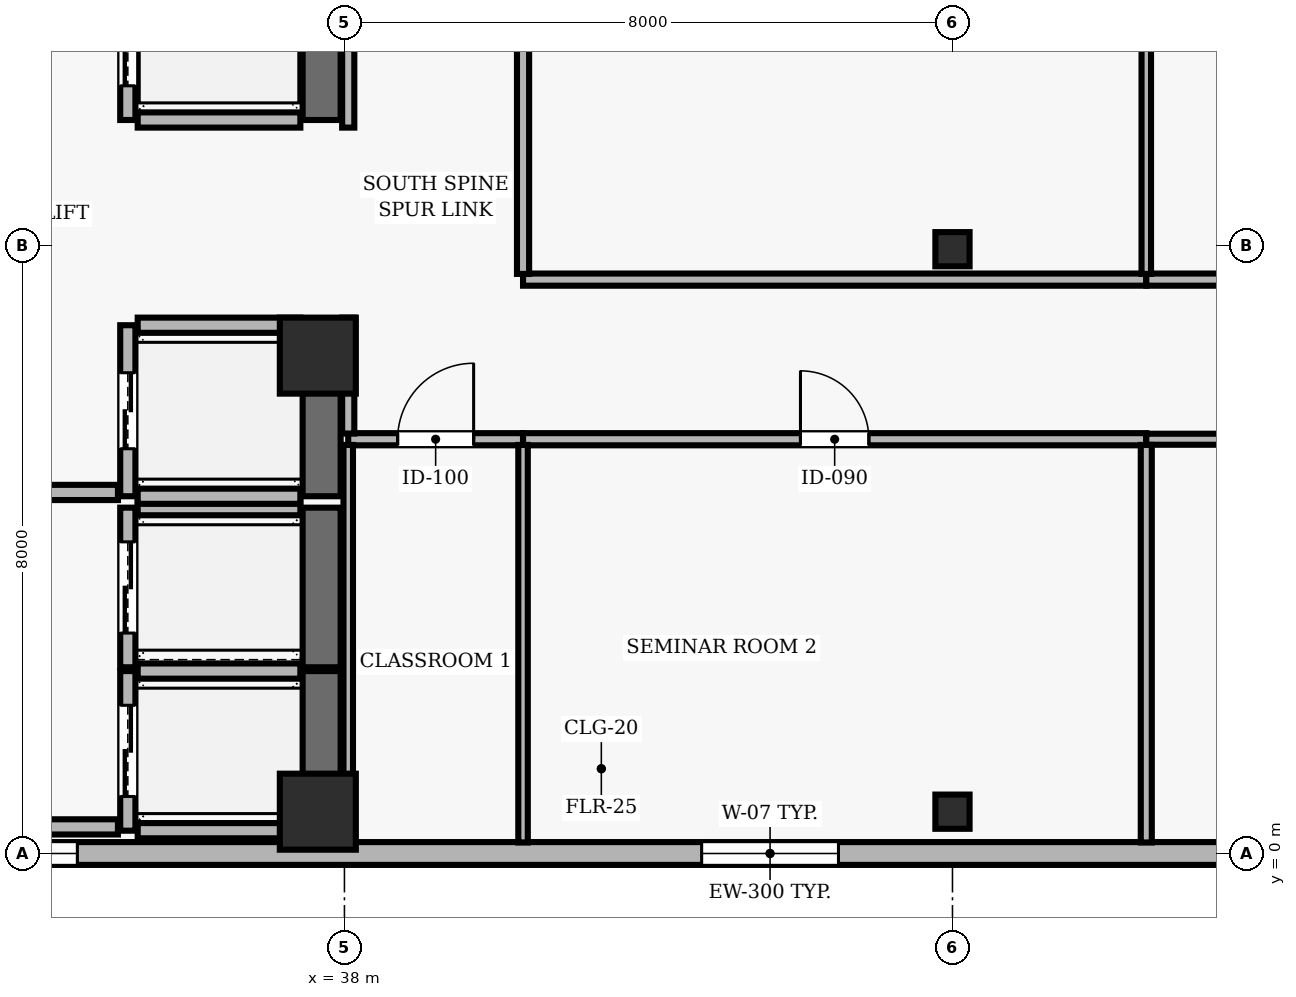
"""IFC4 building model, lengths in metres.
Left out: names, types, materials, properties, quantities, classifications, styles, units other than length and angle.
Written with IfcOpenShell. Run it as: python <this file> out.ifc"""

import sys

from ifc_helpers import new_model, si_unit, direction, frame, frame_2d, origin, origin_2d, place, context, subcontext, project, spatial, rectangle, hollow_rectangle, extrude, element, fill, save


model = new_model("IFC4")
c1 = context("Model", 3, precision=1e-05, world=origin(), true_north=direction((0.0, 1.0)))
c2 = subcontext(c1, "Body", "Model", "MODEL_VIEW")
j1 = project(units=[si_unit("LENGTHUNIT", "METRE"), si_unit("PLANEANGLEUNIT", "RADIAN")], contexts=[c1])
p1 = place(None, origin())
s1 = spatial("IfcSite", under=j1, at=p1, CompositionType="ELEMENT")
p2 = place(p1, origin())
s2 = spatial("IfcBuilding", under=s1, at=p2, CompositionType="ELEMENT")
p3 = place(p2, frame((0.0, 0.0, 175.8)))
s3 = spatial("IfcBuildingStorey", under=s2, at=p3, CompositionType="ELEMENT", Elevation=175.8)
for number, where, z_axis, x_axis in (
    (1, (37.65, 0.55, 0.0), (0.0, 0.0, 1.0), (1.0, 0.0, 0.0)),
    (2, (37.65, 6.55, 0.0), (0.0, 0.0, 1.0), (1.0, 0.0, 0.0)),
):
    element("IfcColumn", number, at=place(p3, frame(where, z_axis=z_axis, x_axis=x_axis)), inside=s3, PredefinedType="COLUMN", context=c2, shape_type="SweptSolid", body=[
        extrude(rectangle(XDim=1.0, YDim=1.0, at=origin_2d()), origin(), (0.0, 0.0, 1.0), 3.9),
    ])
for number, where, z_axis, x_axis in (
    (3, (46.0, 0.55, 0.0), (0.0, 0.0, 1.0), (1.0, 0.0, 0.0)),
    (4, (46.0, 7.95, 0.0), (0.0, 0.0, 1.0), (1.0, 0.0, 0.0)),
):
    element("IfcColumn", number, at=place(p3, frame(where, z_axis=z_axis, x_axis=x_axis)), inside=s3, PredefinedType="COLUMN", context=c2, shape_type="SweptSolid", body=[
        extrude(hollow_rectangle(XDim=0.45, YDim=0.45, WallThickness=0.02, at=origin_2d()), origin(), (0.0, 0.0, 1.0), 3.9),
    ])
p4 = place(p3, frame((24.5, 0.0, 0.0), z_axis=(0.0, 0.0, 1.0), x_axis=(1.0, 0.0, 0.0)))
e5 = element("IfcWall", 5, at=p4, inside=s3, PredefinedType="SOLIDWALL", context=c2, shape_type="SweptSolid", body=[
    extrude(rectangle(XDim=38.2, YDim=0.3, at=frame_2d((19.1, 0.0))), origin(), (0.0, 0.0, 1.0), 3.69),
])
p5 = place(p4, frame((1.829, 0.0, 0.9)))
e6 = element("IfcOpeningElement", 6, at=p5, cuts=e5, PredefinedType="OPENING", context=c2, shape_type="SweptSolid", body=[
    extrude(rectangle(XDim=1.8, YDim=1.8, at=frame_2d((0.9, 0.9))), frame((0.0, 0.16, 0.0), z_axis=(0.0, -1.0, 0.0), x_axis=(1.0, 0.0, 0.0)), (0.0, 0.0, 1.0), 0.32),
])
p6 = place(p4, frame((8.186, 0.0, 0.9)))
e7 = element("IfcOpeningElement", 7, at=p6, cuts=e5, PredefinedType="OPENING", context=c2, shape_type="SweptSolid", body=[
    extrude(rectangle(XDim=1.8, YDim=1.8, at=frame_2d((0.9, 0.9))), frame((0.0, 0.16, 0.0), z_axis=(0.0, -1.0, 0.0), x_axis=(1.0, 0.0, 0.0)), (0.0, 0.0, 1.0), 0.32),
])
p7 = place(p4, frame((18.2, 0.0, 0.9)))
e8 = element("IfcOpeningElement", 8, at=p7, cuts=e5, PredefinedType="OPENING", context=c2, shape_type="SweptSolid", body=[
    extrude(rectangle(XDim=1.8, YDim=1.8, at=frame_2d((0.9, 0.9))), frame((0.0, 0.16, 0.0), z_axis=(0.0, -1.0, 0.0), x_axis=(1.0, 0.0, 0.0)), (0.0, 0.0, 1.0), 0.32),
])
p8 = place(p4, frame((29.114, 0.0, 0.9)))
e9 = element("IfcOpeningElement", 9, at=p8, cuts=e5, PredefinedType="OPENING", context=c2, shape_type="SweptSolid", body=[
    extrude(rectangle(XDim=1.8, YDim=1.8, at=frame_2d((0.9, 0.9))), frame((0.0, 0.16, 0.0), z_axis=(0.0, -1.0, 0.0), x_axis=(1.0, 0.0, 0.0)), (0.0, 0.0, 1.0), 0.32),
])
p9 = place(p4, frame((34.571, 0.0, 0.9)))
e10 = element("IfcOpeningElement", 10, at=p9, cuts=e5, PredefinedType="OPENING", context=c2, shape_type="SweptSolid", body=[
    extrude(rectangle(XDim=1.8, YDim=1.8, at=frame_2d((0.9, 0.9))), frame((0.0, 0.16, 0.0), z_axis=(0.0, -1.0, 0.0), x_axis=(1.0, 0.0, 0.0)), (0.0, 0.0, 1.0), 0.32),
])
p10 = place(p3, frame((35.15, 2.4, 0.0), z_axis=(0.0, 0.0, 1.0), x_axis=(0.0, -1.0, 0.0)))
e11 = element("IfcWall", 11, at=p10, inside=s3, PredefinedType="SOLIDWALL", context=c2, shape_type="SweptSolid", body=[
    extrude(rectangle(XDim=2.1, YDim=0.2, at=frame_2d((1.05, 0.0))), origin(), (0.0, 0.0, 1.0), 3.69),
])
p11 = place(p10, frame((0.45, 0.0, 0.0)))
e12 = element("IfcOpeningElement", 12, at=p11, cuts=e11, PredefinedType="OPENING", context=c2, shape_type="SweptSolid", body=[
    extrude(rectangle(XDim=1.2, YDim=2.15, at=frame_2d((0.6, 1.075))), frame((0.0, 0.11, 0.0), z_axis=(0.0, -1.0, 0.0), x_axis=(1.0, 0.0, 0.0)), (0.0, 0.0, 1.0), 0.22),
])
p12 = place(p3, frame((37.7, 0.3, 0.0), z_axis=(0.0, 0.0, 1.0), x_axis=(0.0, 1.0, 0.0)))
e13 = element("IfcWall", 13, at=p12, inside=s3, PredefinedType="SHEAR", context=c2, shape_type="SweptSolid", body=[
    extrude(rectangle(XDim=2.1, YDim=0.5, at=frame_2d((1.05, 0.0))), origin(), (0.0, 0.0, 1.0), 3.69),
])
for number, where, z_axis, x_axis in (
    (14, (35.28, 0.3, 0.0), (0.0, 0.0, 1.0), (1.0, 0.0, 0.0)),
    (15, (37.42, 2.4, 0.0), (0.0, 0.0, 1.0), (-1.0, 0.0, 0.0)),
):
    element("IfcWall", number, at=place(p3, frame(where, z_axis=z_axis, x_axis=x_axis)), inside=s3, PredefinedType="SOLIDWALL", context=c2, shape_type="SweptSolid", body=[
        extrude(rectangle(XDim=2.14, YDim=0.2, at=frame_2d((1.07, 0.0))), origin(), (0.0, 0.0, 1.0), 3.69),
    ])
p13 = place(p3, frame((35.15, 4.55, 0.0), z_axis=(0.0, 0.0, 1.0), x_axis=(0.0, -1.0, 0.0)))
e16 = element("IfcWall", 16, at=p13, inside=s3, PredefinedType="SOLIDWALL", context=c2, shape_type="SweptSolid", body=[
    extrude(rectangle(XDim=2.1, YDim=0.2, at=frame_2d((1.05, 0.0))), origin(), (0.0, 0.0, 1.0), 3.69),
])
p14 = place(p13, frame((0.45, 0.0, 0.0)))
e17 = element("IfcOpeningElement", 17, at=p14, cuts=e16, PredefinedType="OPENING", context=c2, shape_type="SweptSolid", body=[
    extrude(rectangle(XDim=1.2, YDim=2.15, at=frame_2d((0.6, 1.075))), frame((0.0, 0.11, 0.0), z_axis=(0.0, -1.0, 0.0), x_axis=(1.0, 0.0, 0.0)), (0.0, 0.0, 1.0), 0.22),
])
p15 = place(p3, frame((37.7, 2.45, 0.0), z_axis=(0.0, 0.0, 1.0), x_axis=(0.0, 1.0, 0.0)))
e18 = element("IfcWall", 18, at=p15, inside=s3, PredefinedType="SHEAR", context=c2, shape_type="SweptSolid", body=[
    extrude(rectangle(XDim=2.1, YDim=0.5, at=frame_2d((1.05, 0.0))), origin(), (0.0, 0.0, 1.0), 3.69),
])
p16 = place(p3, frame((37.42, 4.55, 0.0), z_axis=(0.0, 0.0, 1.0), x_axis=(-1.0, 0.0, 0.0)))
e19 = element("IfcWall", 19, at=p16, inside=s3, PredefinedType="SOLIDWALL", context=c2, shape_type="SweptSolid", body=[
    extrude(rectangle(XDim=2.14, YDim=0.2, at=frame_2d((1.07, 0.0))), origin(), (0.0, 0.0, 1.0), 3.69),
])
p17 = place(p3, frame((35.15, 6.95, 0.0), z_axis=(0.0, 0.0, 1.0), x_axis=(0.0, -1.0, 0.0)))
e20 = element("IfcWall", 20, at=p17, inside=s3, PredefinedType="SOLIDWALL", context=c2, shape_type="SweptSolid", body=[
    extrude(rectangle(XDim=2.25, YDim=0.2, at=frame_2d((1.125, 0.0))), origin(), (0.0, 0.0, 1.0), 3.69),
])
p18 = place(p17, frame((0.625, 0.0, 0.0)))
e21 = element("IfcOpeningElement", 21, at=p18, cuts=e20, PredefinedType="OPENING", context=c2, shape_type="SweptSolid", body=[
    extrude(rectangle(XDim=1.0, YDim=2.1, at=frame_2d((0.5, 1.05))), frame((0.0, 0.11, 0.0), z_axis=(0.0, -1.0, 0.0), x_axis=(1.0, 0.0, 0.0)), (0.0, 0.0, 1.0), 0.22),
])
p19 = place(p3, frame((37.7, 4.7, 0.0), z_axis=(0.0, 0.0, 1.0), x_axis=(0.0, 1.0, 0.0)))
e22 = element("IfcWall", 22, at=p19, inside=s3, PredefinedType="SHEAR", context=c2, shape_type="SweptSolid", body=[
    extrude(rectangle(XDim=2.25, YDim=0.5, at=frame_2d((1.125, 0.0))), origin(), (0.0, 0.0, 1.0), 3.69),
])
for number, where, z_axis, x_axis in (
    (23, (35.28, 4.7, 0.0), (0.0, 0.0, 1.0), (1.0, 0.0, 0.0)),
    (24, (37.42, 6.95, 0.0), (0.0, 0.0, 1.0), (-1.0, 0.0, 0.0)),
):
    element("IfcWall", number, at=place(p3, frame(where, z_axis=z_axis, x_axis=x_axis)), inside=s3, PredefinedType="SOLIDWALL", context=c2, shape_type="SweptSolid", body=[
        extrude(rectangle(XDim=2.14, YDim=0.2, at=frame_2d((1.07, 0.0))), origin(), (0.0, 0.0, 1.0), 3.69),
    ])
p20 = place(p3, frame((35.15, 11.55, 0.0), z_axis=(0.0, 0.0, 1.0), x_axis=(0.0, -1.0, 0.0)))
e25 = element("IfcWall", 25, at=p20, inside=s3, PredefinedType="SOLIDWALL", context=c2, shape_type="SweptSolid", body=[
    extrude(rectangle(XDim=1.9, YDim=0.2, at=frame_2d((0.95, 0.0))), origin(), (0.0, 0.0, 1.0), 3.69),
])
p21 = place(p20, frame((0.45, 0.0, 0.0)))
e26 = element("IfcOpeningElement", 26, at=p21, cuts=e25, PredefinedType="OPENING", context=c2, shape_type="SweptSolid", body=[
    extrude(rectangle(XDim=1.0, YDim=2.1, at=frame_2d((0.5, 1.05))), frame((0.0, 0.11, 0.0), z_axis=(0.0, -1.0, 0.0), x_axis=(1.0, 0.0, 0.0)), (0.0, 0.0, 1.0), 0.22),
])
p22 = place(p3, frame((37.7, 9.65, 0.0), z_axis=(0.0, 0.0, 1.0), x_axis=(0.0, 1.0, 0.0)))
e27 = element("IfcWall", 27, at=p22, inside=s3, PredefinedType="SHEAR", context=c2, shape_type="SweptSolid", body=[
    extrude(rectangle(XDim=1.9, YDim=0.5, at=frame_2d((0.95, 0.0))), origin(), (0.0, 0.0, 1.0), 3.69),
])
p23 = place(p3, frame((35.28, 9.65, 0.0), z_axis=(0.0, 0.0, 1.0), x_axis=(1.0, 0.0, 0.0)))
e28 = element("IfcWall", 28, at=p23, inside=s3, PredefinedType="SOLIDWALL", context=c2, shape_type="SweptSolid", body=[
    extrude(rectangle(XDim=2.14, YDim=0.2, at=frame_2d((1.07, 0.0))), origin(), (0.0, 0.0, 1.0), 3.69),
])
p24 = place(p3, frame((31.65, 0.35, 0.0), z_axis=(0.0, 0.0, 1.0), x_axis=(1.0, 0.0, 0.0)))
e29 = element("IfcWall", 29, at=p24, inside=s3, PredefinedType="SOLIDWALL", context=c2, shape_type="SweptSolid", body=[
    extrude(rectangle(XDim=3.37, YDim=0.2, at=frame_2d((1.685, 0.0))), origin(), (0.0, 0.0, 1.0), 3.69),
])
p25 = place(p3, frame((35.02, 4.75, 0.0), z_axis=(0.0, 0.0, 1.0), x_axis=(-1.0, 0.0, 0.0)))
e30 = element("IfcWall", 30, at=p25, inside=s3, PredefinedType="SOLIDWALL", context=c2, shape_type="SweptSolid", body=[
    extrude(rectangle(XDim=3.11, YDim=0.2, at=frame_2d((1.555, 0.0))), origin(), (0.0, 0.0, 1.0), 3.69),
])
p26 = place(p25, frame((1.03, 0.0, 0.0)))
e31 = element("IfcOpeningElement", 31, at=p26, cuts=e30, PredefinedType="OPENING", context=c2, shape_type="SweptSolid", body=[
    extrude(rectangle(XDim=1.05, YDim=2.15, at=frame_2d((0.525, 1.075))), frame((0.0, 0.11, 0.0), z_axis=(0.0, -1.0, 0.0), x_axis=(1.0, 0.0, 0.0)), (0.0, 0.0, 1.0), 0.22),
])
p27 = place(p3, frame((38.05, 5.45, 0.0), z_axis=(0.0, 0.0, 1.0), x_axis=(1.0, 0.0, 0.0)))
e32 = element("IfcWall", 32, at=p27, inside=s3, PredefinedType="PARTITIONING", context=c2, shape_type="SweptSolid", body=[
    extrude(rectangle(XDim=2.3, YDim=0.16, at=frame_2d((1.15, 0.0))), origin(), (0.0, 0.0, 1.0), 3.343),
])
p28 = place(p27, frame((0.65, 0.0, 0.0)))
e33 = element("IfcOpeningElement", 33, at=p28, cuts=e32, PredefinedType="OPENING", context=c2, shape_type="SweptSolid", body=[
    extrude(rectangle(XDim=1.0, YDim=2.1, at=frame_2d((0.5, 1.05))), frame((0.0, 0.09, 0.0), z_axis=(0.0, -1.0, 0.0), x_axis=(1.0, 0.0, 0.0)), (0.0, 0.0, 1.0), 0.18),
])
p29 = place(p3, frame((40.35, 5.45, 0.0), z_axis=(0.0, 0.0, 1.0), x_axis=(1.0, 0.0, 0.0)))
e34 = element("IfcWall", 34, at=p29, inside=s3, PredefinedType="PARTITIONING", context=c2, shape_type="SweptSolid", body=[
    extrude(rectangle(XDim=8.2, YDim=0.16, at=frame_2d((4.1, 0.0))), origin(), (0.0, 0.0, 1.0), 3.343),
])
p30 = place(p29, frame((3.65, 0.0, 0.0)))
e35 = element("IfcOpeningElement", 35, at=p30, cuts=e34, PredefinedType="OPENING", context=c2, shape_type="SweptSolid", body=[
    extrude(rectangle(XDim=0.9, YDim=2.1, at=frame_2d((0.45, 1.05))), frame((0.0, 0.09, 0.0), z_axis=(0.0, -1.0, 0.0), x_axis=(1.0, 0.0, 0.0)), (0.0, 0.0, 1.0), 0.18),
])
p31 = place(p3, frame((48.55, 5.45, 0.0), z_axis=(0.0, 0.0, 1.0), x_axis=(1.0, 0.0, 0.0)))
e36 = element("IfcWall", 36, at=p31, inside=s3, PredefinedType="PARTITIONING", context=c2, shape_type="SweptSolid", body=[
    extrude(rectangle(XDim=9.25, YDim=0.145, at=frame_2d((4.625, 0.0))), origin(), (0.0, 0.0, 1.0), 3.343),
])
p32 = place(p31, frame((4.075, 0.0, 0.0)))
e37 = element("IfcOpeningElement", 37, at=p32, cuts=e36, PredefinedType="OPENING", context=c2, shape_type="SweptSolid", body=[
    extrude(rectangle(XDim=1.1, YDim=2.15, at=frame_2d((0.55, 1.075))), frame((0.0, 0.083, 0.0), z_axis=(0.0, -1.0, 0.0), x_axis=(1.0, 0.0, 0.0)), (0.0, 0.0, 1.0), 0.165),
])
p33 = place(p3, frame((48.55, 7.55, 0.0), z_axis=(0.0, 0.0, 1.0), x_axis=(-1.0, 0.0, 0.0)))
e38 = element("IfcWall", 38, at=p33, inside=s3, PredefinedType="PARTITIONING", context=c2, shape_type="SweptSolid", body=[
    extrude(rectangle(XDim=8.2, YDim=0.16, at=frame_2d((4.1, 0.0))), origin(), (0.0, 0.0, 1.0), 3.139),
])
p34 = place(p3, frame((57.8, 7.55, 0.0), z_axis=(0.0, 0.0, 1.0), x_axis=(-1.0, 0.0, 0.0)))
e39 = element("IfcWall", 39, at=p34, inside=s3, PredefinedType="PARTITIONING", context=c2, shape_type="SweptSolid", body=[
    extrude(rectangle(XDim=9.25, YDim=0.16, at=frame_2d((4.625, 0.0))), origin(), (0.0, 0.0, 1.0), 3.139),
])
p35 = place(p34, frame((3.125, 0.0, 0.0)))
e40 = element("IfcOpeningElement", 40, at=p35, cuts=e39, PredefinedType="OPENING", context=c2, shape_type="SweptSolid", body=[
    extrude(rectangle(XDim=0.9, YDim=2.1, at=frame_2d((0.45, 1.05))), frame((0.0, 0.09, 0.0), z_axis=(0.0, -1.0, 0.0), x_axis=(1.0, 0.0, 0.0)), (0.0, 0.0, 1.0), 0.18),
])
p36 = place(p3, frame((38.05, 5.375, 0.0), z_axis=(0.0, 0.0, 1.0), x_axis=(0.0, -1.0, 0.0)))
e41 = element("IfcWall", 41, at=p36, inside=s3, PredefinedType="PARTITIONING", context=c2, shape_type="SweptSolid", body=[
    extrude(rectangle(XDim=5.23, YDim=0.125, at=frame_2d((2.615, 0.0))), origin(), (0.0, 0.0, 1.0), 3.139),
])
p37 = place(p3, frame((38.05, 7.05, 0.0), z_axis=(0.0, 0.0, 1.0), x_axis=(0.0, -1.0, 0.0)))
e42 = element("IfcWall", 42, at=p37, inside=s3, PredefinedType="PARTITIONING", context=c2, shape_type="SweptSolid", body=[
    extrude(rectangle(XDim=1.525, YDim=0.16, at=frame_2d((0.763, 0.0))), origin(), (0.0, 0.0, 1.0), 3.139),
])
p38 = place(p3, frame((38.05, 15.925, 0.0), z_axis=(0.0, 0.0, 1.0), x_axis=(0.0, -1.0, 0.0)))
e43 = element("IfcWall", 43, at=p38, inside=s3, PredefinedType="PARTITIONING", context=c2, shape_type="SweptSolid", body=[
    extrude(rectangle(XDim=6.375, YDim=0.16, at=frame_2d((3.188, 0.0))), origin(), (0.0, 0.0, 1.0), 3.139),
])
p39 = place(p3, frame((40.35, 0.145, 0.0), z_axis=(0.0, 0.0, 1.0), x_axis=(0.0, 1.0, 0.0)))
e44 = element("IfcWall", 44, at=p39, inside=s3, PredefinedType="PARTITIONING", context=c2, shape_type="SweptSolid", body=[
    extrude(rectangle(XDim=5.23, YDim=0.125, at=frame_2d((2.615, 0.0))), origin(), (0.0, 0.0, 1.0), 3.69),
])
p40 = place(p3, frame((40.35, 7.625, 0.0), z_axis=(0.0, 0.0, 1.0), x_axis=(0.0, 1.0, 0.0)))
e45 = element("IfcWall", 45, at=p40, inside=s3, PredefinedType="PARTITIONING", context=c2, shape_type="SweptSolid", body=[
    extrude(rectangle(XDim=8.3, YDim=0.16, at=frame_2d((4.15, 0.0))), origin(), (0.0, 0.0, 1.0), 3.343),
])
p41 = place(p40, frame((3.65, 0.0, 0.0)))
e46 = element("IfcOpeningElement", 46, at=p41, cuts=e45, PredefinedType="OPENING", context=c2, shape_type="SweptSolid", body=[
    extrude(rectangle(XDim=1.0, YDim=2.1, at=frame_2d((0.5, 1.05))), frame((0.0, 0.09, 0.0), z_axis=(0.0, -1.0, 0.0), x_axis=(1.0, 0.0, 0.0)), (0.0, 0.0, 1.0), 0.18),
])
p42 = place(p3, frame((48.55, 0.145, 0.0), z_axis=(0.0, 0.0, 1.0), x_axis=(0.0, 1.0, 0.0)))
e47 = element("IfcWall", 47, at=p42, inside=s3, PredefinedType="PARTITIONING", context=c2, shape_type="SweptSolid", body=[
    extrude(rectangle(XDim=5.23, YDim=0.145, at=frame_2d((2.615, 0.0))), origin(), (0.0, 0.0, 1.0), 3.69),
])
p43 = place(p3, frame((48.55, 7.625, 0.0), z_axis=(0.0, 0.0, 1.0), x_axis=(0.0, 1.0, 0.0)))
e48 = element("IfcWall", 48, at=p43, inside=s3, PredefinedType="PARTITIONING", context=c2, shape_type="SweptSolid", body=[
    extrude(rectangle(XDim=8.318, YDim=0.125, at=frame_2d((4.159, 0.0))), origin(), (0.0, 0.0, 1.0), 3.69),
])
p44 = place(p6, origin())
e49 = element("IfcWindow", 49, at=p44, inside=s3, PartitioningType="SINGLE_PANEL", PredefinedType="WINDOW", context=c2, shape_type="SweptSolid", body=[
    extrude(rectangle(XDim=1.8, YDim=1.8, at=frame_2d((0.9, 0.9))), frame((0.0, 0.03, 0.0), z_axis=(0.0, -1.0, 0.0), x_axis=(1.0, 0.0, 0.0)), (0.0, 0.0, 1.0), 0.06),
])
fill(e7, e49)
p45 = place(p7, origin())
e50 = element("IfcWindow", 50, at=p45, inside=s3, PartitioningType="SINGLE_PANEL", PredefinedType="WINDOW", context=c2, shape_type="SweptSolid", body=[
    extrude(rectangle(XDim=1.8, YDim=1.8, at=frame_2d((0.9, 0.9))), frame((0.0, 0.03, 0.0), z_axis=(0.0, -1.0, 0.0), x_axis=(1.0, 0.0, 0.0)), (0.0, 0.0, 1.0), 0.06),
])
fill(e8, e50)
p46 = place(p11, origin())
e51 = element("IfcDoor", 51, at=p46, inside=s3, OperationType="DOUBLE_DOOR_SLIDING", PredefinedType="DOOR", context=c2, shape_type="SweptSolid", body=[
    extrude(rectangle(XDim=1.2, YDim=2.15, at=frame_2d((0.6, 1.075))), frame((0.0, 0.025, 0.0), z_axis=(0.0, -1.0, 0.0), x_axis=(1.0, 0.0, 0.0)), (0.0, 0.0, 1.0), 0.05),
])
fill(e12, e51)
p47 = place(p14, origin())
e52 = element("IfcDoor", 52, at=p47, inside=s3, OperationType="DOUBLE_DOOR_SLIDING", PredefinedType="DOOR", context=c2, shape_type="SweptSolid", body=[
    extrude(rectangle(XDim=1.2, YDim=2.15, at=frame_2d((0.6, 1.075))), frame((0.0, 0.025, 0.0), z_axis=(0.0, -1.0, 0.0), x_axis=(1.0, 0.0, 0.0)), (0.0, 0.0, 1.0), 0.05),
])
fill(e17, e52)
p48 = place(p18, origin())
e53 = element("IfcDoor", 53, at=p48, inside=s3, OperationType="DOUBLE_DOOR_SLIDING", PredefinedType="DOOR", context=c2, shape_type="SweptSolid", body=[
    extrude(rectangle(XDim=1.0, YDim=2.1, at=frame_2d((0.5, 1.05))), frame((0.0, 0.025, 0.0), z_axis=(0.0, -1.0, 0.0), x_axis=(1.0, 0.0, 0.0)), (0.0, 0.0, 1.0), 0.05),
])
fill(e21, e53)
p49 = place(p21, origin())
e54 = element("IfcDoor", 54, at=p49, inside=s3, OperationType="DOUBLE_DOOR_SLIDING", PredefinedType="DOOR", context=c2, shape_type="SweptSolid", body=[
    extrude(rectangle(XDim=1.0, YDim=2.1, at=frame_2d((0.5, 1.05))), frame((0.0, 0.025, 0.0), z_axis=(0.0, -1.0, 0.0), x_axis=(1.0, 0.0, 0.0)), (0.0, 0.0, 1.0), 0.05),
])
fill(e26, e54)
p50 = place(p28, origin())
e55 = element("IfcDoor", 55, at=p50, inside=s3, OperationType="SINGLE_SWING_RIGHT", PredefinedType="DOOR", context=c2, shape_type="SweptSolid", body=[
    extrude(rectangle(XDim=1.0, YDim=2.1, at=frame_2d((0.5, 1.05))), frame((0.0, 0.025, 0.0), z_axis=(0.0, -1.0, 0.0), x_axis=(1.0, 0.0, 0.0)), (0.0, 0.0, 1.0), 0.05),
])
fill(e33, e55)
p51 = place(p30, origin())
e56 = element("IfcDoor", 56, at=p51, inside=s3, OperationType="SINGLE_SWING_LEFT", PredefinedType="DOOR", context=c2, shape_type="SweptSolid", body=[
    extrude(rectangle(XDim=0.9, YDim=2.1, at=frame_2d((0.45, 1.05))), frame((0.0, 0.025, 0.0), z_axis=(0.0, -1.0, 0.0), x_axis=(1.0, 0.0, 0.0)), (0.0, 0.0, 1.0), 0.05),
])
fill(e35, e56)
save(model, sys.argv[1])
